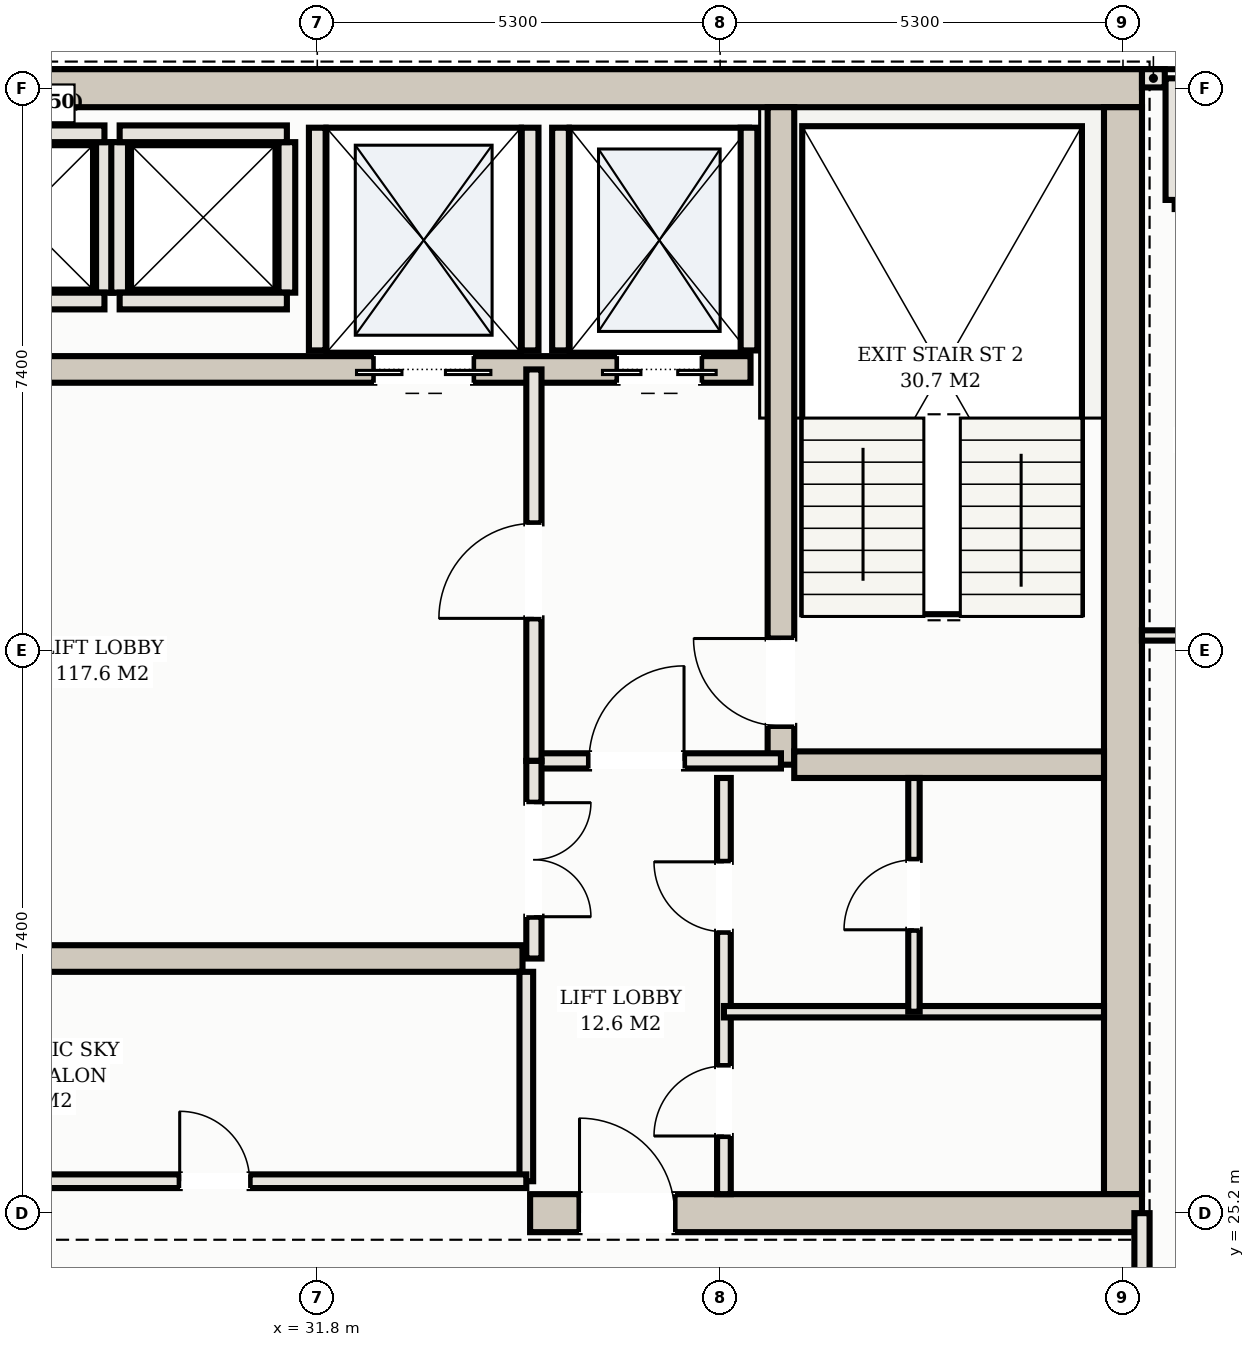
"""IFC4 building model, lengths in metres.
Left out: names, types, materials, properties, quantities, classifications, styles, units other than length and angle.
Written with IfcOpenShell. Run it as: python <this file> out.ifc"""

import sys

from ifc_helpers import new_model, si_unit, direction, frame, frame_2d, origin, place, context, subcontext, project, spatial, rectangle, extrude, element, fill, save


model = new_model("IFC4")
c1 = context("Model", 3, precision=1e-05, world=origin(), true_north=direction((0.0, 1.0)))
c2 = subcontext(c1, "Body", "Model", "MODEL_VIEW")
j1 = project(units=[si_unit("LENGTHUNIT", "METRE"), si_unit("PLANEANGLEUNIT", "RADIAN")], contexts=[c1])
p1 = place(None, origin())
s1 = spatial("IfcSite", under=j1, at=p1, CompositionType="ELEMENT")
p2 = place(p1, origin())
s2 = spatial("IfcBuilding", under=s1, at=p2, CompositionType="ELEMENT")
p3 = place(p2, frame((0.0, 0.0, 223.1)))
s3 = spatial("IfcBuildingStorey", under=s2, at=p3, CompositionType="ELEMENT", Elevation=223.1)
p4 = place(p3, frame((10.35, 40.0, 0.0), z_axis=(0.0, 0.0, 1.0), x_axis=(1.0, 0.0, 0.0)))
e1 = element("IfcWall", 1, at=p4, inside=s3, PredefinedType="SHEAR", context=c2, shape_type="SweptSolid", body=[
    extrude(rectangle(XDim=32.3, YDim=0.5, at=frame_2d((16.15, 0.0))), origin(), (0.0, 0.0, 1.0), 3.11),
])
p5 = place(p3, frame((42.4, 25.45, 0.0), z_axis=(0.0, 0.0, 1.0), x_axis=(0.0, 1.0, 0.0)))
e2 = element("IfcWall", 2, at=p5, inside=s3, PredefinedType="SHEAR", context=c2, shape_type="SweptSolid", body=[
    extrude(rectangle(XDim=14.3, YDim=0.5, at=frame_2d((7.15, 0.0))), origin(), (0.0, 0.0, 1.0), 3.11),
])
p6 = place(p3, frame((34.6, 25.2, 0.0), z_axis=(0.0, 0.0, 1.0), x_axis=(1.0, 0.0, 0.0)))
e3 = element("IfcWall", 3, at=p6, inside=s3, PredefinedType="SHEAR", context=c2, shape_type="SweptSolid", body=[
    extrude(rectangle(XDim=8.05, YDim=0.5, at=frame_2d((4.025, 0.0))), origin(), (0.0, 0.0, 1.0), 3.11),
])
p7 = place(p6, frame((0.65, 0.0, 0.0)))
e4 = element("IfcOpeningElement", 4, at=p7, cuts=e3, PredefinedType="OPENING", context=c2, shape_type="SweptSolid", body=[
    extrude(rectangle(XDim=1.25, YDim=2.2, at=frame_2d((0.625, 1.1))), frame((0.0, 0.26, 0.0), z_axis=(0.0, -1.0, 0.0), x_axis=(1.0, 0.0, 0.0)), (0.0, 0.0, 1.0), 0.52),
])
p8 = place(p3, frame((37.9, 31.1, 0.0), z_axis=(0.0, 0.0, 1.0), x_axis=(0.0, 1.0, 0.0)))
e5 = element("IfcWall", 5, at=p8, inside=s3, PredefinedType="SHEAR", context=c2, shape_type="SweptSolid", body=[
    extrude(rectangle(XDim=8.65, YDim=0.35, at=frame_2d((4.325, 0.0))), origin(), (0.0, 0.0, 1.0), 3.11),
])
p9 = place(p8, frame((0.51, 0.0, 0.0)))
e6 = element("IfcOpeningElement", 6, at=p9, cuts=e5, PredefinedType="OPENING", context=c2, shape_type="SweptSolid", body=[
    extrude(rectangle(XDim=1.15, YDim=2.2, at=frame_2d((0.575, 1.1))), frame((0.0, 0.185, 0.0), z_axis=(0.0, -1.0, 0.0), x_axis=(1.0, 0.0, 0.0)), (0.0, 0.0, 1.0), 0.37),
])
p10 = place(p3, frame((38.075, 31.1, 0.0), z_axis=(0.0, 0.0, 1.0), x_axis=(1.0, 0.0, 0.0)))
e7 = element("IfcWall", 7, at=p10, inside=s3, PredefinedType="SHEAR", context=c2, shape_type="SweptSolid", body=[
    extrude(rectangle(XDim=4.075, YDim=0.35, at=frame_2d((2.038, 0.0))), origin(), (0.0, 0.0, 1.0), 3.11),
])
p11 = place(p3, frame((15.5, 36.3, 0.0), z_axis=(0.0, 0.0, 1.0), x_axis=(1.0, 0.0, 0.0)))
e8 = element("IfcWall", 8, at=p11, inside=s3, PredefinedType="SHEAR", context=c2, shape_type="SweptSolid", body=[
    extrude(rectangle(XDim=22.0, YDim=0.35, at=frame_2d((11.0, 0.0))), origin(), (0.0, 0.0, 1.0), 3.11),
])
p12 = place(p11, frame((0.65, 0.0, 0.0)))
e9 = element("IfcOpeningElement", 9, at=p12, cuts=e8, PredefinedType="OPENING", context=c2, shape_type="SweptSolid", body=[
    extrude(rectangle(XDim=1.1, YDim=2.15, at=frame_2d((0.55, 1.075))), frame((0.0, 0.185, 0.0), z_axis=(0.0, -1.0, 0.0), x_axis=(1.0, 0.0, 0.0)), (0.0, 0.0, 1.0), 0.37),
])
p13 = place(p11, frame((20.25, 0.0, 0.0)))
e10 = element("IfcOpeningElement", 10, at=p13, cuts=e8, PredefinedType="OPENING", context=c2, shape_type="SweptSolid", body=[
    extrude(rectangle(XDim=1.1, YDim=2.15, at=frame_2d((0.55, 1.075))), frame((0.0, 0.185, 0.0), z_axis=(0.0, -1.0, 0.0), x_axis=(1.0, 0.0, 0.0)), (0.0, 0.0, 1.0), 0.37),
])
p14 = place(p11, frame((17.05, 0.0, 0.0)))
e11 = element("IfcOpeningElement", 11, at=p14, cuts=e8, PredefinedType="OPENING", context=c2, shape_type="SweptSolid", body=[
    extrude(rectangle(XDim=1.3, YDim=2.2, at=frame_2d((0.65, 1.1))), frame((0.0, 0.185, 0.0), z_axis=(0.0, -1.0, 0.0), x_axis=(1.0, 0.0, 0.0)), (0.0, 0.0, 1.0), 0.37),
])
p15 = place(p11, frame((3.95, 0.0, 0.0)))
e12 = element("IfcOpeningElement", 12, at=p15, cuts=e8, PredefinedType="OPENING", context=c2, shape_type="SweptSolid", body=[
    extrude(rectangle(XDim=1.1, YDim=2.15, at=frame_2d((0.55, 1.075))), frame((0.0, 0.185, 0.0), z_axis=(0.0, -1.0, 0.0), x_axis=(1.0, 0.0, 0.0)), (0.0, 0.0, 1.0), 0.37),
])
p16 = place(p11, frame((6.55, 0.0, 0.0)))
e13 = element("IfcOpeningElement", 13, at=p16, cuts=e8, PredefinedType="OPENING", context=c2, shape_type="SweptSolid", body=[
    extrude(rectangle(XDim=1.1, YDim=2.15, at=frame_2d((0.55, 1.075))), frame((0.0, 0.185, 0.0), z_axis=(0.0, -1.0, 0.0), x_axis=(1.0, 0.0, 0.0)), (0.0, 0.0, 1.0), 0.37),
])
p17 = place(p11, frame((9.15, 0.0, 0.0)))
e14 = element("IfcOpeningElement", 14, at=p17, cuts=e8, PredefinedType="OPENING", context=c2, shape_type="SweptSolid", body=[
    extrude(rectangle(XDim=1.1, YDim=2.15, at=frame_2d((0.55, 1.075))), frame((0.0, 0.185, 0.0), z_axis=(0.0, -1.0, 0.0), x_axis=(1.0, 0.0, 0.0)), (0.0, 0.0, 1.0), 0.37),
])
p18 = place(p3, frame((18.5, 28.55, 0.0), z_axis=(0.0, 0.0, 1.0), x_axis=(1.0, 0.0, 0.0)))
e15 = element("IfcWall", 15, at=p18, inside=s3, PredefinedType="SHEAR", context=c2, shape_type="SweptSolid", body=[
    extrude(rectangle(XDim=16.0, YDim=0.35, at=frame_2d((8.0, 0.0))), origin(), (0.0, 0.0, 1.0), 3.11),
])
for number, where, z_axis, x_axis in (
    (16, (35.0, 36.55, 0.0), (0.0, 0.0, 1.0), (0.0, 1.0, 0.0)),
    (17, (37.48, 36.55, 0.0), (0.0, 0.0, 1.0), (0.0, 1.0, 0.0)),
    (18, (31.8, 36.55, 0.0), (0.0, 0.0, 1.0), (0.0, 1.0, 0.0)),
    (19, (34.6, 36.55, 0.0), (0.0, 0.0, 1.0), (0.0, 1.0, 0.0)),
):
    element("IfcWall", number, at=place(p3, frame(where, z_axis=z_axis, x_axis=x_axis)), inside=s3, PredefinedType="SOLIDWALL", context=c2, shape_type="SweptSolid", body=[
        extrude(rectangle(XDim=2.93, YDim=0.22, at=frame_2d((1.465, 0.0))), origin(), (0.0, 0.0, 1.0), 3.11),
    ])
p19 = place(p3, frame((29.0, 37.31, 0.0), z_axis=(0.0, 0.0, 1.0), x_axis=(0.0, 1.0, 0.0)))
e20 = element("IfcWall", 20, at=p19, inside=s3, PredefinedType="SOLIDWALL", context=c2, shape_type="SweptSolid", body=[
    extrude(rectangle(XDim=1.98, YDim=0.22, at=frame_2d((0.99, 0.0))), origin(), (0.0, 0.0, 1.0), 3.11),
])
for number, where, z_axis, x_axis in (
    (21, (26.8, 39.4, 0.0), (0.0, 0.0, 1.0), (1.0, 0.0, 0.0)),
    (22, (26.8, 37.2, 0.0), (0.0, 0.0, 1.0), (1.0, 0.0, 0.0)),
):
    element("IfcWall", number, at=place(p3, frame(where, z_axis=z_axis, x_axis=x_axis)), inside=s3, PredefinedType="SOLIDWALL", context=c2, shape_type="SweptSolid", body=[
        extrude(rectangle(XDim=2.2, YDim=0.22, at=frame_2d((1.1, 0.0))), origin(), (0.0, 0.0, 1.0), 3.11),
    ])
for number, where, z_axis, x_axis in (
    (23, (29.2, 37.31, 0.0), (0.0, 0.0, 1.0), (0.0, 1.0, 0.0)),
    (24, (31.4, 37.31, 0.0), (0.0, 0.0, 1.0), (0.0, 1.0, 0.0)),
):
    element("IfcWall", number, at=place(p3, frame(where, z_axis=z_axis, x_axis=x_axis)), inside=s3, PredefinedType="SOLIDWALL", context=c2, shape_type="SweptSolid", body=[
        extrude(rectangle(XDim=1.98, YDim=0.22, at=frame_2d((0.99, 0.0))), origin(), (0.0, 0.0, 1.0), 3.11),
    ])
for number, where, z_axis, x_axis in (
    (25, (29.2, 39.4, 0.0), (0.0, 0.0, 1.0), (1.0, 0.0, 0.0)),
    (26, (29.2, 37.2, 0.0), (0.0, 0.0, 1.0), (1.0, 0.0, 0.0)),
):
    element("IfcWall", number, at=place(p3, frame(where, z_axis=z_axis, x_axis=x_axis)), inside=s3, PredefinedType="SOLIDWALL", context=c2, shape_type="SweptSolid", body=[
        extrude(rectangle(XDim=2.2, YDim=0.22, at=frame_2d((1.1, 0.0))), origin(), (0.0, 0.0, 1.0), 3.11),
    ])
for number, where, z_axis, x_axis in (
    (27, (44.68, 38.53, 0.0), (0.0, 0.0, 1.0), (-1.0, 0.0, 0.0)),
    (28, (43.08, 38.53, 0.0), (0.0, 0.0, 1.0), (0.0, 1.0, 0.0)),
):
    element("IfcWall", number, at=place(p3, frame(where, z_axis=z_axis, x_axis=x_axis)), inside=s3, PredefinedType="SOLIDWALL", context=c2, shape_type="SweptSolid", body=[
        extrude(rectangle(XDim=1.6, YDim=0.24, at=frame_2d((0.8, 0.0))), origin(), (0.0, 0.0, 1.0), 3.11),
    ])
p20 = place(p3, frame((42.95, 40.13, 0.0), z_axis=(0.0, 0.0, 1.0), x_axis=(-1.0, 0.0, 0.0)))
e29 = element("IfcWall", 29, at=p20, inside=s3, PredefinedType="SOLIDWALL", context=c2, shape_type="SweptSolid", body=[
    extrude(rectangle(XDim=0.3, YDim=0.24, at=frame_2d((0.15, 0.0))), origin(), (0.0, 0.0, 1.0), 3.11),
])
p21 = place(p3, frame((34.65, 31.15, 0.0), z_axis=(0.0, 0.0, 1.0), x_axis=(1.0, 0.0, 0.0)))
e30 = element("IfcWall", 30, at=p21, inside=s3, PredefinedType="PARTITIONING", context=c2, shape_type="SweptSolid", body=[
    extrude(rectangle(XDim=3.25, YDim=0.2, at=frame_2d((1.625, 0.0))), origin(), (0.0, 0.0, 1.0), 2.43),
])
p22 = place(p21, frame((0.725, 0.0, 0.0)))
e31 = element("IfcOpeningElement", 31, at=p22, cuts=e30, PredefinedType="OPENING", context=c2, shape_type="SweptSolid", body=[
    extrude(rectangle(XDim=1.25, YDim=2.2, at=frame_2d((0.625, 1.1))), frame((0.0, 0.11, 0.0), z_axis=(0.0, -1.0, 0.0), x_axis=(1.0, 0.0, 0.0)), (0.0, 0.0, 1.0), 0.22),
])
p23 = place(p3, frame((34.65, 31.15, 0.0), z_axis=(0.0, 0.0, 1.0), x_axis=(0.0, 1.0, 0.0)))
e32 = element("IfcWall", 32, at=p23, inside=s3, PredefinedType="PARTITIONING", context=c2, shape_type="SweptSolid", body=[
    extrude(rectangle(XDim=5.15, YDim=0.2, at=frame_2d((2.575, 0.0))), origin(), (0.0, 0.0, 1.0), 2.43),
])
p24 = place(p23, frame((1.875, 0.0, 0.0)))
e33 = element("IfcOpeningElement", 33, at=p24, cuts=e32, PredefinedType="OPENING", context=c2, shape_type="SweptSolid", body=[
    extrude(rectangle(XDim=1.25, YDim=2.2, at=frame_2d((0.625, 1.1))), frame((0.0, 0.11, 0.0), z_axis=(0.0, -1.0, 0.0), x_axis=(1.0, 0.0, 0.0)), (0.0, 0.0, 1.0), 0.22),
])
p25 = place(p3, frame((37.15, 25.45, 0.0), z_axis=(0.0, 0.0, 1.0), x_axis=(0.0, 1.0, 0.0)))
e34 = element("IfcWall", 34, at=p25, inside=s3, PredefinedType="PARTITIONING", context=c2, shape_type="SweptSolid", body=[
    extrude(rectangle(XDim=5.475, YDim=0.18, at=frame_2d((2.738, 0.0))), origin(), (0.0, 0.0, 1.0), 2.43),
])
p26 = place(p25, frame((0.765, 0.0, 0.0)))
e35 = element("IfcOpeningElement", 35, at=p26, cuts=e34, PredefinedType="OPENING", context=c2, shape_type="SweptSolid", body=[
    extrude(rectangle(XDim=0.92, YDim=2.15, at=frame_2d((0.46, 1.075))), frame((0.0, 0.1, 0.0), z_axis=(0.0, -1.0, 0.0), x_axis=(1.0, 0.0, 0.0)), (0.0, 0.0, 1.0), 0.2),
])
p27 = place(p25, frame((3.452, 0.0, 0.0)))
e36 = element("IfcOpeningElement", 36, at=p27, cuts=e34, PredefinedType="OPENING", context=c2, shape_type="SweptSolid", body=[
    extrude(rectangle(XDim=0.92, YDim=2.15, at=frame_2d((0.46, 1.075))), frame((0.0, 0.1, 0.0), z_axis=(0.0, -1.0, 0.0), x_axis=(1.0, 0.0, 0.0)), (0.0, 0.0, 1.0), 0.2),
])
p28 = place(p3, frame((37.15, 27.85, 0.0), z_axis=(0.0, 0.0, 1.0), x_axis=(1.0, 0.0, 0.0)))
e37 = element("IfcWall", 37, at=p28, inside=s3, PredefinedType="PARTITIONING", context=c2, shape_type="SweptSolid", body=[
    extrude(rectangle(XDim=5.0, YDim=0.15, at=frame_2d((2.5, 0.0))), origin(), (0.0, 0.0, 1.0), 2.43),
])
p29 = place(p3, frame((39.65, 27.85, 0.0), z_axis=(0.0, 0.0, 1.0), x_axis=(0.0, 1.0, 0.0)))
e38 = element("IfcWall", 38, at=p29, inside=s3, PredefinedType="PARTITIONING", context=c2, shape_type="SweptSolid", body=[
    extrude(rectangle(XDim=3.075, YDim=0.15, at=frame_2d((1.538, 0.0))), origin(), (0.0, 0.0, 1.0), 2.43),
])
p30 = place(p29, frame((1.078, 0.0, 0.0)))
e39 = element("IfcOpeningElement", 39, at=p30, cuts=e38, PredefinedType="OPENING", context=c2, shape_type="SweptSolid", body=[
    extrude(rectangle(XDim=0.92, YDim=2.15, at=frame_2d((0.46, 1.075))), frame((0.0, 0.085, 0.0), z_axis=(0.0, -1.0, 0.0), x_axis=(1.0, 0.0, 0.0)), (0.0, 0.0, 1.0), 0.17),
])
p31 = place(p3, frame((34.65, 28.55, 0.0), z_axis=(0.0, 0.0, 1.0), x_axis=(0.0, 1.0, 0.0)))
e40 = element("IfcWall", 40, at=p31, inside=s3, PredefinedType="PARTITIONING", context=c2, shape_type="SweptSolid", body=[
    extrude(rectangle(XDim=2.6, YDim=0.2, at=frame_2d((1.3, 0.0))), origin(), (0.0, 0.0, 1.0), 2.43),
])
p32 = place(p31, frame((0.55, 0.0, 0.0)))
e41 = element("IfcOpeningElement", 41, at=p32, cuts=e40, PredefinedType="OPENING", context=c2, shape_type="SweptSolid", body=[
    extrude(rectangle(XDim=1.5, YDim=2.25, at=frame_2d((0.75, 1.125))), frame((0.0, 0.11, 0.0), z_axis=(0.0, -1.0, 0.0), x_axis=(1.0, 0.0, 0.0)), (0.0, 0.0, 1.0), 0.22),
])
p33 = place(p3, frame((34.55, 25.62, 0.0), z_axis=(0.0, 0.0, 1.0), x_axis=(0.0, 1.0, 0.0)))
e42 = element("IfcWall", 42, at=p33, inside=s3, PredefinedType="PARTITIONING", context=c2, shape_type="SweptSolid", body=[
    extrude(rectangle(XDim=2.755, YDim=0.18, at=frame_2d((1.377, 0.0))), origin(), (0.0, 0.0, 1.0), 2.43),
])
p34 = place(p3, frame((26.65, 25.62, 0.0), z_axis=(0.0, 0.0, 1.0), x_axis=(1.0, 0.0, 0.0)))
e43 = element("IfcWall", 43, at=p34, inside=s3, PredefinedType="PARTITIONING", context=c2, shape_type="SweptSolid", body=[
    extrude(rectangle(XDim=7.9, YDim=0.18, at=frame_2d((3.95, 0.0))), origin(), (0.0, 0.0, 1.0), 2.43),
])
p35 = place(p34, frame((3.34, 0.0, 0.0)))
e44 = element("IfcOpeningElement", 44, at=p35, cuts=e43, PredefinedType="OPENING", context=c2, shape_type="SweptSolid", body=[
    extrude(rectangle(XDim=0.92, YDim=2.15, at=frame_2d((0.46, 1.075))), frame((0.0, 0.1, 0.0), z_axis=(0.0, -1.0, 0.0), x_axis=(1.0, 0.0, 0.0)), (0.0, 0.0, 1.0), 0.2),
])
p36 = place(p3, frame((42.65, 23.75, 0.0), z_axis=(0.0, 0.0, 1.0), x_axis=(0.0, 1.0, 0.0)))
e45 = element("IfcWall", 45, at=p36, inside=s3, PredefinedType="PARTITIONING", context=c2, shape_type="SweptSolid", body=[
    extrude(rectangle(XDim=1.45, YDim=0.2, at=frame_2d((0.725, 0.0))), origin(), (0.0, 0.0, 1.0), 2.43),
])
p37 = place(p3, frame((42.65, 32.8, 0.0), z_axis=(0.0, 0.0, 1.0), x_axis=(1.0, 0.0, 0.0)))
e46 = element("IfcWall", 46, at=p37, inside=s3, PredefinedType="PARTITIONING", context=c2, shape_type="SweptSolid", body=[
    extrude(rectangle(XDim=3.63, YDim=0.135, at=frame_2d((1.815, 0.0))), origin(), (0.0, 0.0, 1.0), 2.43),
])
p38 = place(p37, frame((1.355, 0.0, 0.0)))
e47 = element("IfcOpeningElement", 47, at=p38, cuts=e46, PredefinedType="OPENING", context=c2, shape_type="SweptSolid", body=[
    extrude(rectangle(XDim=0.92, YDim=2.15, at=frame_2d((0.46, 1.075))), frame((0.0, 0.078, 0.0), z_axis=(0.0, -1.0, 0.0), x_axis=(1.0, 0.0, 0.0)), (0.0, 0.0, 1.0), 0.155),
])
p39 = place(p13, frame((1.1, 0.0, 0.0), z_axis=(0.0, 0.0, 1.0), x_axis=(-1.0, 0.0, 0.0)))
e48 = element("IfcDoor", 48, at=p39, inside=s3, OperationType="DOUBLE_DOOR_SLIDING", PredefinedType="DOOR", context=c2, shape_type="SweptSolid", body=[
    extrude(rectangle(XDim=1.1, YDim=2.15, at=frame_2d((0.55, 1.075))), frame((0.0, 0.025, 0.0), z_axis=(0.0, -1.0, 0.0), x_axis=(1.0, 0.0, 0.0)), (0.0, 0.0, 1.0), 0.05),
])
fill(e10, e48)
p40 = place(p14, frame((1.3, 0.0, 0.0), z_axis=(0.0, 0.0, 1.0), x_axis=(-1.0, 0.0, 0.0)))
e49 = element("IfcDoor", 49, at=p40, inside=s3, OperationType="DOUBLE_DOOR_SLIDING", PredefinedType="DOOR", context=c2, shape_type="SweptSolid", body=[
    extrude(rectangle(XDim=1.3, YDim=2.2, at=frame_2d((0.65, 1.1))), frame((0.0, 0.025, 0.0), z_axis=(0.0, -1.0, 0.0), x_axis=(1.0, 0.0, 0.0)), (0.0, 0.0, 1.0), 0.05),
])
fill(e11, e49)
p41 = place(p7, origin())
e50 = element("IfcDoor", 50, at=p41, inside=s3, OperationType="SINGLE_SWING_LEFT", PredefinedType="DOOR", context=c2, shape_type="SweptSolid", body=[
    extrude(rectangle(XDim=1.25, YDim=2.2, at=frame_2d((0.625, 1.1))), frame((0.0, 0.025, 0.0), z_axis=(0.0, -1.0, 0.0), x_axis=(1.0, 0.0, 0.0)), (0.0, 0.0, 1.0), 0.05),
])
fill(e4, e50)
p42 = place(p22, origin())
e51 = element("IfcDoor", 51, at=p42, inside=s3, OperationType="SINGLE_SWING_RIGHT", PredefinedType="DOOR", context=c2, shape_type="SweptSolid", body=[
    extrude(rectangle(XDim=1.25, YDim=2.2, at=frame_2d((0.625, 1.1))), frame((0.0, 0.025, 0.0), z_axis=(0.0, -1.0, 0.0), x_axis=(1.0, 0.0, 0.0)), (0.0, 0.0, 1.0), 0.05),
])
fill(e31, e51)
p43 = place(p24, origin())
e52 = element("IfcDoor", 52, at=p43, inside=s3, OperationType="SINGLE_SWING_LEFT", PredefinedType="DOOR", context=c2, shape_type="SweptSolid", body=[
    extrude(rectangle(XDim=1.25, YDim=2.2, at=frame_2d((0.625, 1.1))), frame((0.0, 0.025, 0.0), z_axis=(0.0, -1.0, 0.0), x_axis=(1.0, 0.0, 0.0)), (0.0, 0.0, 1.0), 0.05),
])
fill(e33, e52)
p44 = place(p9, origin())
e53 = element("IfcDoor", 53, at=p44, inside=s3, OperationType="SINGLE_SWING_RIGHT", PredefinedType="DOOR", context=c2, shape_type="SweptSolid", body=[
    extrude(rectangle(XDim=1.15, YDim=2.2, at=frame_2d((0.575, 1.1))), frame((0.0, 0.025, 0.0), z_axis=(0.0, -1.0, 0.0), x_axis=(1.0, 0.0, 0.0)), (0.0, 0.0, 1.0), 0.05),
])
fill(e6, e53)
p45 = place(p26, origin())
e54 = element("IfcDoor", 54, at=p45, inside=s3, OperationType="SINGLE_SWING_LEFT", PredefinedType="DOOR", context=c2, shape_type="SweptSolid", body=[
    extrude(rectangle(XDim=0.92, YDim=2.15, at=frame_2d((0.46, 1.075))), frame((0.0, 0.025, 0.0), z_axis=(0.0, -1.0, 0.0), x_axis=(1.0, 0.0, 0.0)), (0.0, 0.0, 1.0), 0.05),
])
fill(e35, e54)
p46 = place(p27, origin())
e55 = element("IfcDoor", 55, at=p46, inside=s3, OperationType="SINGLE_SWING_RIGHT", PredefinedType="DOOR", context=c2, shape_type="SweptSolid", body=[
    extrude(rectangle(XDim=0.92, YDim=2.15, at=frame_2d((0.46, 1.075))), frame((0.0, 0.025, 0.0), z_axis=(0.0, -1.0, 0.0), x_axis=(1.0, 0.0, 0.0)), (0.0, 0.0, 1.0), 0.05),
])
fill(e36, e55)
p47 = place(p30, origin())
e56 = element("IfcDoor", 56, at=p47, inside=s3, OperationType="SINGLE_SWING_LEFT", PredefinedType="DOOR", context=c2, shape_type="SweptSolid", body=[
    extrude(rectangle(XDim=0.92, YDim=2.15, at=frame_2d((0.46, 1.075))), frame((0.0, 0.025, 0.0), z_axis=(0.0, -1.0, 0.0), x_axis=(1.0, 0.0, 0.0)), (0.0, 0.0, 1.0), 0.05),
])
fill(e39, e56)
p48 = place(p32, frame((1.5, 0.0, 0.0), z_axis=(0.0, 0.0, 1.0), x_axis=(-1.0, 0.0, 0.0)))
e57 = element("IfcDoor", 57, at=p48, inside=s3, OperationType="DOUBLE_DOOR_SINGLE_SWING", PredefinedType="DOOR", context=c2, shape_type="SweptSolid", body=[
    extrude(rectangle(XDim=1.5, YDim=2.25, at=frame_2d((0.75, 1.125))), frame((0.0, 0.025, 0.0), z_axis=(0.0, -1.0, 0.0), x_axis=(1.0, 0.0, 0.0)), (0.0, 0.0, 1.0), 0.05),
])
fill(e41, e57)
p49 = place(p35, origin())
e58 = element("IfcDoor", 58, at=p49, inside=s3, OperationType="SINGLE_SWING_LEFT", PredefinedType="DOOR", context=c2, shape_type="SweptSolid", body=[
    extrude(rectangle(XDim=0.92, YDim=2.15, at=frame_2d((0.46, 1.075))), frame((0.0, 0.025, 0.0), z_axis=(0.0, -1.0, 0.0), x_axis=(1.0, 0.0, 0.0)), (0.0, 0.0, 1.0), 0.05),
])
fill(e44, e58)
save(model, sys.argv[1])
